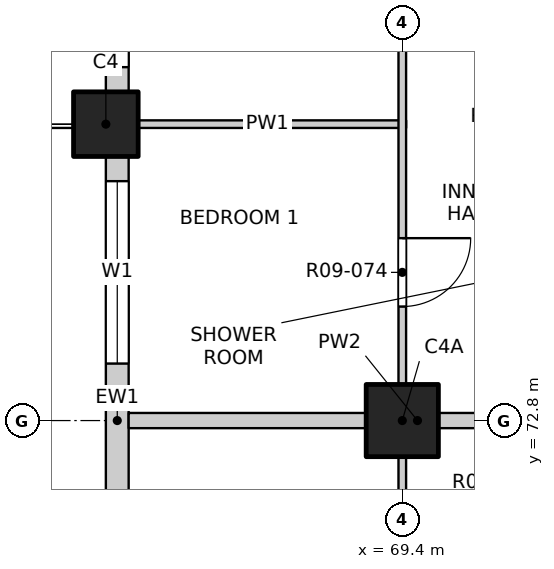
"""IFC4 building model, lengths in metres.
Left out: names, types, materials, properties, quantities, classifications, styles, units other than length and angle.
Written with IfcOpenShell. Run it as: python <this file> out.ifc"""

import sys

from ifc_helpers import new_model, si_unit, direction, frame, frame_2d, origin, origin_2d, place, context, subcontext, project, spatial, rectangle, extrude, element, fill, save


model = new_model("IFC4")
c1 = context("Model", 3, precision=1e-05, world=origin(), true_north=direction((0.0, 1.0)))
c2 = subcontext(c1, "Body", "Model", "MODEL_VIEW")
j1 = project(units=[si_unit("LENGTHUNIT", "METRE"), si_unit("PLANEANGLEUNIT", "RADIAN")], contexts=[c1])
p1 = place(None, origin())
s1 = spatial("IfcSite", under=j1, at=p1, CompositionType="ELEMENT")
p2 = place(p1, origin())
s2 = spatial("IfcBuilding", under=s1, at=p2, CompositionType="ELEMENT")
p3 = place(p2, frame((0.0, 0.0, 110.1)))
s3 = spatial("IfcBuildingStorey", under=s2, at=p3, CompositionType="ELEMENT", Elevation=110.1)
p4 = place(p3, frame((65.5, 76.7, -0.25), z_axis=(0.0, 0.0, 1.0), x_axis=(1.0, 0.0, 0.0)))
e1 = element("IfcColumn", 1, at=p4, inside=s3, PredefinedType="COLUMN", context=c2, shape_type="SweptSolid", body=[
    extrude(rectangle(XDim=0.85, YDim=0.85, at=origin_2d()), origin(), (0.0, 0.0, 1.0), 3.4),
])
p5 = place(p3, frame((69.4, 72.8, -0.25), z_axis=(0.0, 0.0, 1.0), x_axis=(1.0, 0.0, 0.0)))
e2 = element("IfcColumn", 2, at=p5, inside=s3, PredefinedType="COLUMN", context=c2, shape_type="SweptSolid", body=[
    extrude(rectangle(XDim=0.95, YDim=0.95, at=origin_2d()), origin(), (0.0, 0.0, 1.0), 3.4),
])
p6 = place(p3, frame((65.65, 69.325, 0.0), z_axis=(0.0, 0.0, 1.0), x_axis=(0.0, 1.0, 0.0)))
e3 = element("IfcWall", 3, at=p6, inside=s3, PredefinedType="SOLIDWALL", context=c2, shape_type="SweptSolid", body=[
    extrude(rectangle(XDim=6.95, YDim=0.3, at=frame_2d((3.475, 0.0))), origin(), (0.0, 0.0, 1.0), 2.7),
])
p7 = place(p6, frame((0.625, 0.0, 0.0)))
e4 = element("IfcOpeningElement", 4, at=p7, cuts=e3, PredefinedType="OPENING", context=c2, shape_type="SweptSolid", body=[
    extrude(rectangle(XDim=1.8, YDim=2.4, at=frame_2d((0.9, 1.2))), frame((0.0, 0.16, 0.0), z_axis=(0.0, -1.0, 0.0), x_axis=(1.0, 0.0, 0.0)), (0.0, 0.0, 1.0), 0.32),
])
p8 = place(p6, frame((4.225, 0.0, 0.9)))
e5 = element("IfcOpeningElement", 5, at=p8, cuts=e3, PredefinedType="OPENING", context=c2, shape_type="SweptSolid", body=[
    extrude(rectangle(XDim=2.4, YDim=1.8, at=frame_2d((1.2, 0.9))), frame((0.0, 0.16, 0.0), z_axis=(0.0, -1.0, 0.0), x_axis=(1.0, 0.0, 0.0)), (0.0, 0.0, 1.0), 0.32),
])
p9 = place(p3, frame((65.65, 77.125, 0.0), z_axis=(0.0, 0.0, 1.0), x_axis=(0.0, 1.0, 0.0)))
e6 = element("IfcWall", 6, at=p9, inside=s3, PredefinedType="SOLIDWALL", context=c2, shape_type="SweptSolid", body=[
    extrude(rectangle(XDim=3.475, YDim=0.3, at=frame_2d((1.738, 0.0))), origin(), (0.0, 0.0, 1.0), 2.7),
])
p10 = place(p9, frame((0.325, 0.0, 0.9)))
e7 = element("IfcOpeningElement", 7, at=p10, cuts=e6, PredefinedType="OPENING", context=c2, shape_type="SweptSolid", body=[
    extrude(rectangle(XDim=2.4, YDim=1.8, at=frame_2d((1.2, 0.9))), frame((0.0, 0.16, 0.0), z_axis=(0.0, -1.0, 0.0), x_axis=(1.0, 0.0, 0.0)), (0.0, 0.0, 1.0), 0.32),
])
p11 = place(p3, frame((65.8, 72.8, 0.0), z_axis=(0.0, 0.0, 1.0), x_axis=(1.0, 0.0, 0.0)))
e8 = element("IfcWall", 8, at=p11, inside=s3, PredefinedType="PARTITIONING", context=c2, shape_type="SweptSolid", body=[
    extrude(rectangle(XDim=7.6, YDim=0.2, at=frame_2d((3.8, 0.0))), origin(), (0.0, 0.0, 1.0), 3.15),
])
p12 = place(p3, frame((65.8, 76.7, 0.0), z_axis=(0.0, 0.0, 1.0), x_axis=(1.0, 0.0, 0.0)))
e9 = element("IfcWall", 9, at=p12, inside=s3, PredefinedType="PARTITIONING", context=c2, shape_type="SweptSolid", body=[
    extrude(rectangle(XDim=3.65, YDim=0.1, at=frame_2d((1.825, 0.0))), origin(), (0.0, 0.0, 1.0), 2.55),
])
p13 = place(p3, frame((69.4, 45.8, 0.0), z_axis=(0.0, 0.0, 1.0), x_axis=(0.0, 1.0, 0.0)))
e10 = element("IfcWall", 10, at=p13, inside=s3, PredefinedType="PARTITIONING", context=c2, shape_type="SweptSolid", body=[
    extrude(rectangle(XDim=38.4, YDim=0.1, at=frame_2d((19.2, 0.0))), origin(), (0.0, 0.0, 1.0), 3.15),
])
p14 = place(p13, frame((1.05, 0.0, 0.0)))
e11 = element("IfcOpeningElement", 11, at=p14, cuts=e10, PredefinedType="OPENING", context=c2, shape_type="SweptSolid", body=[
    extrude(rectangle(XDim=1.2, YDim=2.1, at=frame_2d((0.6, 1.05))), frame((0.0, 0.06, 0.0), z_axis=(0.0, -1.0, 0.0), x_axis=(1.0, 0.0, 0.0)), (0.0, 0.0, 1.0), 0.12),
])
p15 = place(p13, frame((5.1, 0.0, 0.0)))
e12 = element("IfcOpeningElement", 12, at=p15, cuts=e10, PredefinedType="OPENING", context=c2, shape_type="SweptSolid", body=[
    extrude(rectangle(XDim=0.9, YDim=2.1, at=frame_2d((0.45, 1.05))), frame((0.0, 0.06, 0.0), z_axis=(0.0, -1.0, 0.0), x_axis=(1.0, 0.0, 0.0)), (0.0, 0.0, 1.0), 0.12),
])
p16 = place(p13, frame((9.0, 0.0, 0.0)))
e13 = element("IfcOpeningElement", 13, at=p16, cuts=e10, PredefinedType="OPENING", context=c2, shape_type="SweptSolid", body=[
    extrude(rectangle(XDim=0.9, YDim=2.1, at=frame_2d((0.45, 1.05))), frame((0.0, 0.06, 0.0), z_axis=(0.0, -1.0, 0.0), x_axis=(1.0, 0.0, 0.0)), (0.0, 0.0, 1.0), 0.12),
])
p17 = place(p13, frame((12.9, 0.0, 0.0)))
e14 = element("IfcOpeningElement", 14, at=p17, cuts=e10, PredefinedType="OPENING", context=c2, shape_type="SweptSolid", body=[
    extrude(rectangle(XDim=0.9, YDim=2.1, at=frame_2d((0.45, 1.05))), frame((0.0, 0.06, 0.0), z_axis=(0.0, -1.0, 0.0), x_axis=(1.0, 0.0, 0.0)), (0.0, 0.0, 1.0), 0.12),
])
p18 = place(p13, frame((16.8, 0.0, 0.0)))
e15 = element("IfcOpeningElement", 15, at=p18, cuts=e10, PredefinedType="OPENING", context=c2, shape_type="SweptSolid", body=[
    extrude(rectangle(XDim=0.9, YDim=2.1, at=frame_2d((0.45, 1.05))), frame((0.0, 0.06, 0.0), z_axis=(0.0, -1.0, 0.0), x_axis=(1.0, 0.0, 0.0)), (0.0, 0.0, 1.0), 0.12),
])
p19 = place(p13, frame((20.7, 0.0, 0.0)))
e16 = element("IfcOpeningElement", 16, at=p19, cuts=e10, PredefinedType="OPENING", context=c2, shape_type="SweptSolid", body=[
    extrude(rectangle(XDim=0.9, YDim=2.1, at=frame_2d((0.45, 1.05))), frame((0.0, 0.06, 0.0), z_axis=(0.0, -1.0, 0.0), x_axis=(1.0, 0.0, 0.0)), (0.0, 0.0, 1.0), 0.12),
])
p20 = place(p13, frame((24.6, 0.0, 0.0)))
e17 = element("IfcOpeningElement", 17, at=p20, cuts=e10, PredefinedType="OPENING", context=c2, shape_type="SweptSolid", body=[
    extrude(rectangle(XDim=0.9, YDim=2.1, at=frame_2d((0.45, 1.05))), frame((0.0, 0.06, 0.0), z_axis=(0.0, -1.0, 0.0), x_axis=(1.0, 0.0, 0.0)), (0.0, 0.0, 1.0), 0.12),
])
p21 = place(p13, frame((28.5, 0.0, 0.0)))
e18 = element("IfcOpeningElement", 18, at=p21, cuts=e10, PredefinedType="OPENING", context=c2, shape_type="SweptSolid", body=[
    extrude(rectangle(XDim=0.9, YDim=2.1, at=frame_2d((0.45, 1.05))), frame((0.0, 0.06, 0.0), z_axis=(0.0, -1.0, 0.0), x_axis=(1.0, 0.0, 0.0)), (0.0, 0.0, 1.0), 0.12),
])
p22 = place(p13, frame((32.4, 0.0, 0.0)))
e19 = element("IfcOpeningElement", 19, at=p22, cuts=e10, PredefinedType="OPENING", context=c2, shape_type="SweptSolid", body=[
    extrude(rectangle(XDim=0.9, YDim=2.1, at=frame_2d((0.45, 1.05))), frame((0.0, 0.06, 0.0), z_axis=(0.0, -1.0, 0.0), x_axis=(1.0, 0.0, 0.0)), (0.0, 0.0, 1.0), 0.12),
])
p23 = place(p13, frame((36.15, 0.0, 0.0)))
e20 = element("IfcOpeningElement", 20, at=p23, cuts=e10, PredefinedType="OPENING", context=c2, shape_type="SweptSolid", body=[
    extrude(rectangle(XDim=1.2, YDim=2.1, at=frame_2d((0.6, 1.05))), frame((0.0, 0.06, 0.0), z_axis=(0.0, -1.0, 0.0), x_axis=(1.0, 0.0, 0.0)), (0.0, 0.0, 1.0), 0.12),
])
p24 = place(p8, origin())
e21 = element("IfcWindow", 21, at=p24, inside=s3, PartitioningType="DOUBLE_PANEL_VERTICAL", PredefinedType="WINDOW", context=c2, shape_type="SweptSolid", body=[
    extrude(rectangle(XDim=2.4, YDim=1.8, at=frame_2d((1.2, 0.9))), frame((0.0, 0.03, 0.0), z_axis=(0.0, -1.0, 0.0), x_axis=(1.0, 0.0, 0.0)), (0.0, 0.0, 1.0), 0.06),
])
fill(e5, e21)
p25 = place(p10, origin())
e22 = element("IfcWindow", 22, at=p25, inside=s3, PartitioningType="DOUBLE_PANEL_VERTICAL", PredefinedType="WINDOW", context=c2, shape_type="SweptSolid", body=[
    extrude(rectangle(XDim=2.4, YDim=1.8, at=frame_2d((1.2, 0.9))), frame((0.0, 0.03, 0.0), z_axis=(0.0, -1.0, 0.0), x_axis=(1.0, 0.0, 0.0)), (0.0, 0.0, 1.0), 0.06),
])
fill(e7, e22)
p26 = place(p21, origin())
e23 = element("IfcDoor", 23, at=p26, inside=s3, OperationType="SINGLE_SWING_LEFT", PredefinedType="DOOR", context=c2, shape_type="SweptSolid", body=[
    extrude(rectangle(XDim=0.9, YDim=2.1, at=frame_2d((0.45, 1.05))), frame((0.0, 0.025, 0.0), z_axis=(0.0, -1.0, 0.0), x_axis=(1.0, 0.0, 0.0)), (0.0, 0.0, 1.0), 0.05),
])
fill(e18, e23)
save(model, sys.argv[1])
